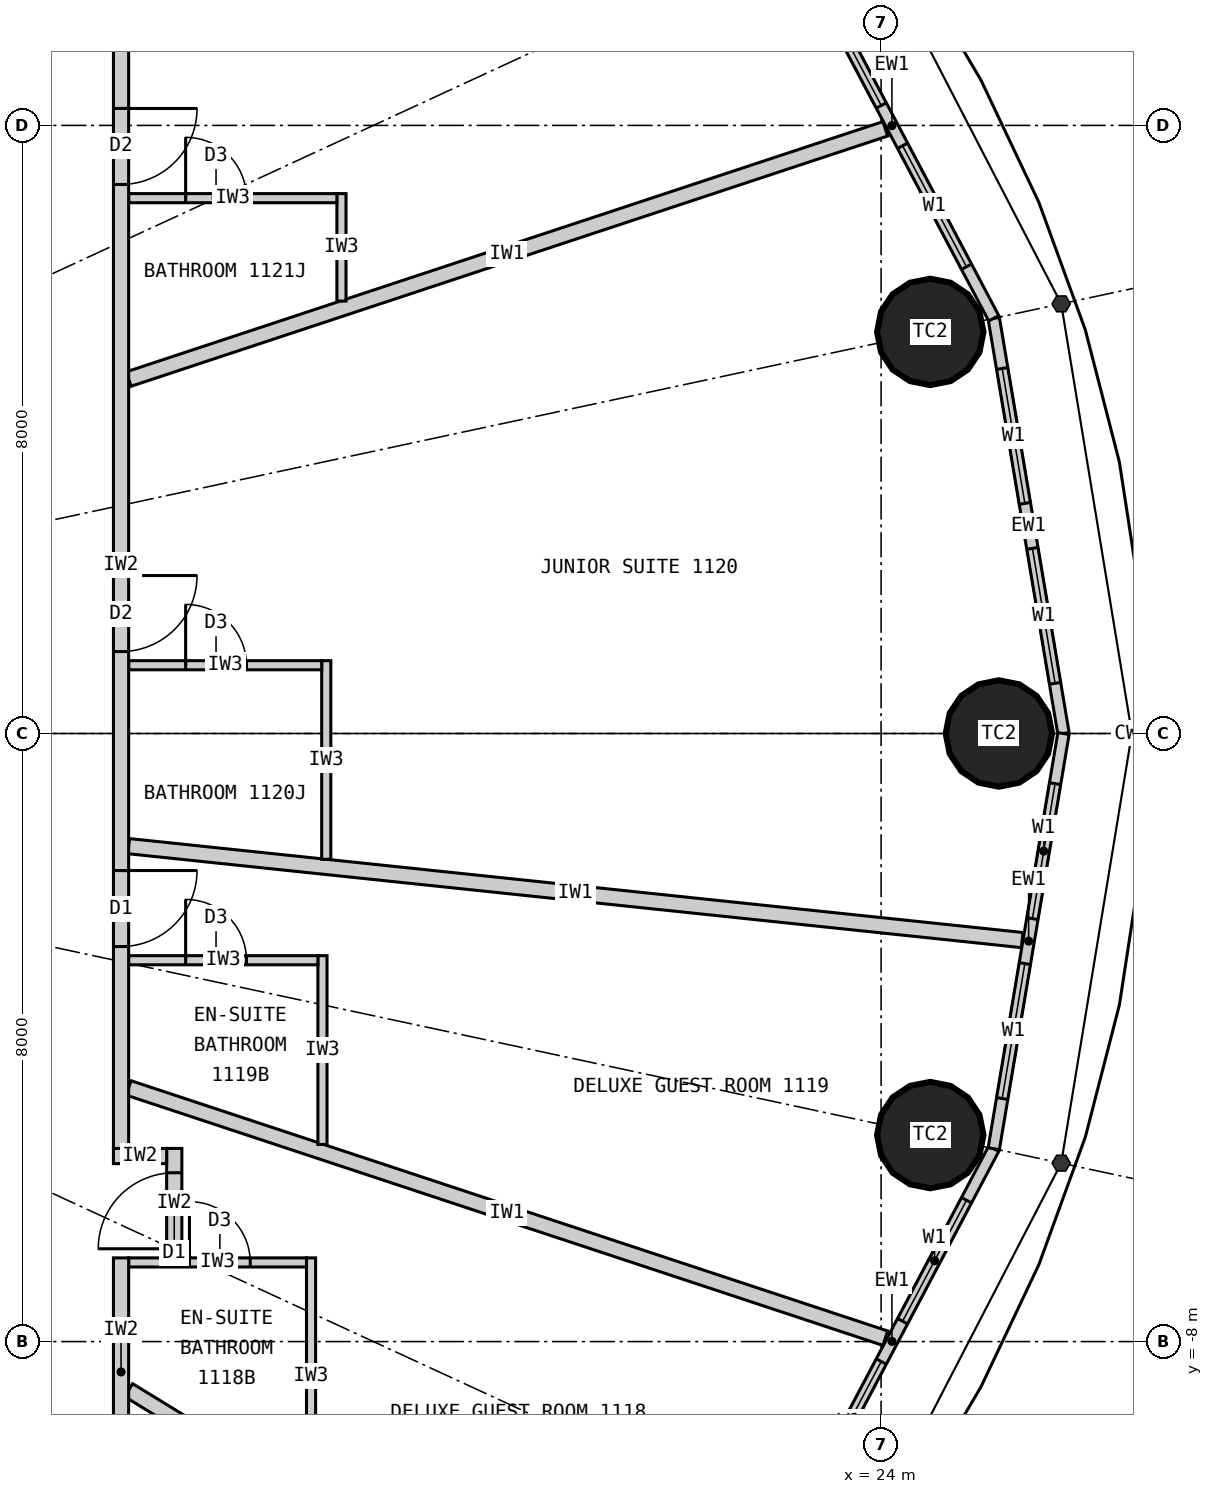
"""IFC4 building model, lengths in metres.
Left out: names, types, materials, properties, quantities, classifications, styles, units other than length and angle.
Written with IfcOpenShell. Run it as: python <this file> out.ifc"""

import sys

from ifc_helpers import new_model, si_unit, direction, frame, frame_2d, origin, origin_2d, place, context, subcontext, project, spatial, rectangle, circle, extrude, element, fill, save


model = new_model("IFC4")
c1 = context("Model", 3, precision=1e-05, world=origin(), true_north=direction((0.0, 1.0)))
c2 = subcontext(c1, "Body", "Model", "MODEL_VIEW")
j1 = project(units=[si_unit("LENGTHUNIT", "METRE"), si_unit("PLANEANGLEUNIT", "RADIAN")], contexts=[c1])
p1 = place(None, origin())
s1 = spatial("IfcSite", under=j1, at=p1, CompositionType="ELEMENT")
p2 = place(p1, origin())
s2 = spatial("IfcBuilding", under=s1, at=p2, CompositionType="ELEMENT")
p3 = place(p2, frame((0.0, 0.0, 50.7)))
s3 = spatial("IfcBuildingStorey", under=s2, at=p3, CompositionType="ELEMENT", Elevation=50.7)
for number, where, z_axis, x_axis in (
    (1, (25.55, 0.0, 0.0), (0.0, 0.0, 1.0), (1.0, 0.0, 0.0)),
    (2, (24.647, 5.283, 0.0), (0.0, 0.0, 1.0), (1.0, 0.0, 0.0)),
    (3, (24.647, -5.283, 0.0), (0.0, 0.0, 1.0), (1.0, 0.0, 0.0)),
):
    element("IfcColumn", number, at=place(p3, frame(where, z_axis=z_axis, x_axis=x_axis)), inside=s3, PredefinedType="COLUMN", context=c2, shape_type="SweptSolid", body=[
        extrude(circle(Radius=0.7, at=origin_2d()), origin(), (0.0, 0.0, 1.0), 3.3),
    ])
p4 = place(p3, frame((26.4, 0.0, 0.0), z_axis=(0.0, 0.0, 1.0), x_axis=(-0.165642551694, 0.986185857264, 0.0)))
e4 = element("IfcWall", 4, at=p4, inside=s3, PredefinedType="ELEMENTEDWALL", context=c2, shape_type="SweptSolid", body=[
    extrude(rectangle(XDim=5.539, YDim=0.15, at=frame_2d((2.77, 0.0))), origin(), (0.0, 0.0, 1.0), 3.12),
])
p5 = place(p4, frame((0.669, 0.0, 0.9)))
e5 = element("IfcOpeningElement", 5, at=p5, cuts=e4, PredefinedType="OPENING", context=c2, shape_type="SweptSolid", body=[
    extrude(rectangle(XDim=1.8, YDim=1.9, at=frame_2d((0.9, 0.95))), frame((0.0, 0.085, 0.0), z_axis=(0.0, -1.0, 0.0), x_axis=(1.0, 0.0, 0.0)), (0.0, 0.0, 1.0), 0.17),
])
p6 = place(p4, frame((3.07, 0.0, 0.9)))
e6 = element("IfcOpeningElement", 6, at=p6, cuts=e4, PredefinedType="OPENING", context=c2, shape_type="SweptSolid", body=[
    extrude(rectangle(XDim=1.8, YDim=1.9, at=frame_2d((0.9, 0.95))), frame((0.0, 0.085, 0.0), z_axis=(0.0, -1.0, 0.0), x_axis=(1.0, 0.0, 0.0)), (0.0, 0.0, 1.0), 0.17),
])
p7 = place(p3, frame((25.482, 5.462, 0.0), z_axis=(0.0, 0.0, 1.0), x_axis=(-0.467296867008, 0.884100468321, 0.0)))
e7 = element("IfcWall", 7, at=p7, inside=s3, PredefinedType="ELEMENTEDWALL", context=c2, shape_type="SweptSolid", body=[
    extrude(rectangle(XDim=5.734, YDim=0.15, at=frame_2d((2.867, 0.0))), origin(), (0.0, 0.0, 1.0), 3.12),
])
p8 = place(p7, frame((0.767, 0.0, 0.9)))
e8 = element("IfcOpeningElement", 8, at=p8, cuts=e7, PredefinedType="OPENING", context=c2, shape_type="SweptSolid", body=[
    extrude(rectangle(XDim=1.8, YDim=1.9, at=frame_2d((0.9, 0.95))), frame((0.0, 0.085, 0.0), z_axis=(0.0, -1.0, 0.0), x_axis=(1.0, 0.0, 0.0)), (0.0, 0.0, 1.0), 0.17),
])
p9 = place(p7, frame((3.167, 0.0, 0.9)))
e9 = element("IfcOpeningElement", 9, at=p9, cuts=e7, PredefinedType="OPENING", context=c2, shape_type="SweptSolid", body=[
    extrude(rectangle(XDim=1.8, YDim=1.9, at=frame_2d((0.9, 0.95))), frame((0.0, 0.085, 0.0), z_axis=(0.0, -1.0, 0.0), x_axis=(1.0, 0.0, 0.0)), (0.0, 0.0, 1.0), 0.17),
])
p10 = place(p3, frame((22.803, -10.532, 0.0), z_axis=(0.0, 0.0, 1.0), x_axis=(0.467296867008, 0.884100468321, 0.0)))
e10 = element("IfcWall", 10, at=p10, inside=s3, PredefinedType="ELEMENTEDWALL", context=c2, shape_type="SweptSolid", body=[
    extrude(rectangle(XDim=5.734, YDim=0.15, at=frame_2d((2.867, 0.0))), origin(), (0.0, 0.0, 1.0), 3.12),
])
p11 = place(p10, frame((0.767, 0.0, 0.9)))
e11 = element("IfcOpeningElement", 11, at=p11, cuts=e10, PredefinedType="OPENING", context=c2, shape_type="SweptSolid", body=[
    extrude(rectangle(XDim=1.8, YDim=1.9, at=frame_2d((0.9, 0.95))), frame((0.0, 0.085, 0.0), z_axis=(0.0, -1.0, 0.0), x_axis=(1.0, 0.0, 0.0)), (0.0, 0.0, 1.0), 0.17),
])
p12 = place(p10, frame((3.167, 0.0, 0.9)))
e12 = element("IfcOpeningElement", 12, at=p12, cuts=e10, PredefinedType="OPENING", context=c2, shape_type="SweptSolid", body=[
    extrude(rectangle(XDim=1.8, YDim=1.9, at=frame_2d((0.9, 0.95))), frame((0.0, 0.085, 0.0), z_axis=(0.0, -1.0, 0.0), x_axis=(1.0, 0.0, 0.0)), (0.0, 0.0, 1.0), 0.17),
])
p13 = place(p3, frame((25.482, -5.462, 0.0), z_axis=(0.0, 0.0, 1.0), x_axis=(0.165642551694, 0.986185857264, 0.0)))
e13 = element("IfcWall", 13, at=p13, inside=s3, PredefinedType="ELEMENTEDWALL", context=c2, shape_type="SweptSolid", body=[
    extrude(rectangle(XDim=5.539, YDim=0.15, at=frame_2d((2.77, 0.0))), origin(), (0.0, 0.0, 1.0), 3.12),
])
p14 = place(p13, frame((0.669, 0.0, 0.9)))
e14 = element("IfcOpeningElement", 14, at=p14, cuts=e13, PredefinedType="OPENING", context=c2, shape_type="SweptSolid", body=[
    extrude(rectangle(XDim=1.8, YDim=1.9, at=frame_2d((0.9, 0.95))), frame((0.0, 0.085, 0.0), z_axis=(0.0, -1.0, 0.0), x_axis=(1.0, 0.0, 0.0)), (0.0, 0.0, 1.0), 0.17),
])
p15 = place(p13, frame((3.07, 0.0, 0.9)))
e15 = element("IfcOpeningElement", 15, at=p15, cuts=e13, PredefinedType="OPENING", context=c2, shape_type="SweptSolid", body=[
    extrude(rectangle(XDim=1.8, YDim=1.9, at=frame_2d((0.9, 0.95))), frame((0.0, 0.085, 0.0), z_axis=(0.0, -1.0, 0.0), x_axis=(1.0, 0.0, 0.0)), (0.0, 0.0, 1.0), 0.17),
])
p16 = place(p3, frame((14.1, 4.663, 0.0), z_axis=(0.0, 0.0, 1.0), x_axis=(0.949432655039, 0.31397075269, 0.0)))
e16 = element("IfcWall", 16, at=p16, inside=s3, PredefinedType="PARTITIONING", context=c2, shape_type="SweptSolid", body=[
    extrude(rectangle(XDim=10.486, YDim=0.2, at=frame_2d((5.243, 0.0))), origin(), (0.0, 0.0, 1.0), 3.12),
])
p17 = place(p3, frame((14.1, -8.639, 0.0), z_axis=(0.0, 0.0, 1.0), x_axis=(0.852672493023, -0.522445805459, 0.0)))
e17 = element("IfcWall", 17, at=p17, inside=s3, PredefinedType="PARTITIONING", context=c2, shape_type="SweptSolid", body=[
    extrude(rectangle(XDim=7.633, YDim=0.2, at=frame_2d((3.817, 0.0))), origin(), (0.0, 0.0, 1.0), 3.12),
])
p18 = place(p3, frame((14.1, -4.663, 0.0), z_axis=(0.0, 0.0, 1.0), x_axis=(0.949432655039, -0.31397075269, 0.0)))
e18 = element("IfcWall", 18, at=p18, inside=s3, PredefinedType="PARTITIONING", context=c2, shape_type="SweptSolid", body=[
    extrude(rectangle(XDim=10.486, YDim=0.2, at=frame_2d((5.243, 0.0))), origin(), (0.0, 0.0, 1.0), 3.12),
])
p19 = place(p3, frame((14.1, -1.482, 0.0), z_axis=(0.0, 0.0, 1.0), x_axis=(0.994522076235, -0.104526742422, 0.0)))
e19 = element("IfcWall", 19, at=p19, inside=s3, PredefinedType="PARTITIONING", context=c2, shape_type="SweptSolid", body=[
    extrude(rectangle(XDim=11.821, YDim=0.2, at=frame_2d((5.91, 0.0))), origin(), (0.0, 0.0, 1.0), 2.32),
])
p20 = place(p3, frame((16.5, -10.01, 0.0), z_axis=(0.0, 0.0, 1.0), x_axis=(0.0, 1.0, 0.0)))
e20 = element("IfcWall", 20, at=p20, inside=s3, PredefinedType="PARTITIONING", context=c2, shape_type="SweptSolid", body=[
    extrude(rectangle(XDim=3.111, YDim=0.12, at=frame_2d((1.555, 0.0))), origin(), (0.0, 0.0, 1.0), 3.12),
])
p21 = place(p3, frame((14.1, -6.959, 0.0), z_axis=(0.0, 0.0, 1.0), x_axis=(1.0, 0.0, 0.0)))
e21 = element("IfcWall", 21, at=p21, inside=s3, PredefinedType="PARTITIONING", context=c2, shape_type="SweptSolid", body=[
    extrude(rectangle(XDim=2.34, YDim=0.12, at=frame_2d((1.17, 0.0))), origin(), (0.0, 0.0, 1.0), 3.12),
])
p22 = place(p21, frame((0.8, 0.0, 0.0)))
e22 = element("IfcOpeningElement", 22, at=p22, cuts=e21, PredefinedType="OPENING", context=c2, shape_type="SweptSolid", body=[
    extrude(rectangle(XDim=0.8, YDim=2.1, at=frame_2d((0.4, 1.05))), frame((0.0, 0.07, 0.0), z_axis=(0.0, -1.0, 0.0), x_axis=(1.0, 0.0, 0.0)), (0.0, 0.0, 1.0), 0.14),
])
p23 = place(p3, frame((16.65, -5.406, 0.0), z_axis=(0.0, 0.0, 1.0), x_axis=(0.0, 1.0, 0.0)))
e23 = element("IfcWall", 23, at=p23, inside=s3, PredefinedType="PARTITIONING", context=c2, shape_type="SweptSolid", body=[
    extrude(rectangle(XDim=2.483, YDim=0.12, at=frame_2d((1.242, 0.0))), origin(), (0.0, 0.0, 1.0), 3.12),
])
p24 = place(p3, frame((14.1, -2.983, 0.0), z_axis=(0.0, 0.0, 1.0), x_axis=(1.0, 0.0, 0.0)))
e24 = element("IfcWall", 24, at=p24, inside=s3, PredefinedType="PARTITIONING", context=c2, shape_type="SweptSolid", body=[
    extrude(rectangle(XDim=2.49, YDim=0.12, at=frame_2d((1.245, 0.0))), origin(), (0.0, 0.0, 1.0), 3.12),
])
p25 = place(p24, frame((0.75, 0.0, 0.0)))
e25 = element("IfcOpeningElement", 25, at=p25, cuts=e24, PredefinedType="OPENING", context=c2, shape_type="SweptSolid", body=[
    extrude(rectangle(XDim=0.8, YDim=2.1, at=frame_2d((0.4, 1.05))), frame((0.0, 0.07, 0.0), z_axis=(0.0, -1.0, 0.0), x_axis=(1.0, 0.0, 0.0)), (0.0, 0.0, 1.0), 0.14),
])
p26 = place(p3, frame((16.7, -1.655, 0.0), z_axis=(0.0, 0.0, 1.0), x_axis=(0.0, 1.0, 0.0)))
e26 = element("IfcWall", 26, at=p26, inside=s3, PredefinedType="PARTITIONING", context=c2, shape_type="SweptSolid", body=[
    extrude(rectangle(XDim=2.613, YDim=0.12, at=frame_2d((1.307, 0.0))), origin(), (0.0, 0.0, 1.0), 3.12),
])
p27 = place(p3, frame((14.1, 0.898, 0.0), z_axis=(0.0, 0.0, 1.0), x_axis=(1.0, 0.0, 0.0)))
e27 = element("IfcWall", 27, at=p27, inside=s3, PredefinedType="PARTITIONING", context=c2, shape_type="SweptSolid", body=[
    extrude(rectangle(XDim=2.54, YDim=0.12, at=frame_2d((1.27, 0.0))), origin(), (0.0, 0.0, 1.0), 3.12),
])
p28 = place(p27, frame((0.75, 0.0, 0.0)))
e28 = element("IfcOpeningElement", 28, at=p28, cuts=e27, PredefinedType="OPENING", context=c2, shape_type="SweptSolid", body=[
    extrude(rectangle(XDim=0.8, YDim=2.1, at=frame_2d((0.4, 1.05))), frame((0.0, 0.07, 0.0), z_axis=(0.0, -1.0, 0.0), x_axis=(1.0, 0.0, 0.0)), (0.0, 0.0, 1.0), 0.14),
])
p29 = place(p3, frame((16.9, 5.689, 0.0), z_axis=(0.0, 0.0, 1.0), x_axis=(0.0, 1.0, 0.0)))
e29 = element("IfcWall", 29, at=p29, inside=s3, PredefinedType="PARTITIONING", context=c2, shape_type="SweptSolid", body=[
    extrude(rectangle(XDim=1.414, YDim=0.12, at=frame_2d((0.707, 0.0))), origin(), (0.0, 0.0, 1.0), 3.12),
])
p30 = place(p3, frame((14.1, 7.043, 0.0), z_axis=(0.0, 0.0, 1.0), x_axis=(1.0, 0.0, 0.0)))
e30 = element("IfcWall", 30, at=p30, inside=s3, PredefinedType="PARTITIONING", context=c2, shape_type="SweptSolid", body=[
    extrude(rectangle(XDim=2.74, YDim=0.12, at=frame_2d((1.37, 0.0))), origin(), (0.0, 0.0, 1.0), 3.12),
])
p31 = place(p30, frame((0.75, 0.0, 0.0)))
e31 = element("IfcOpeningElement", 31, at=p31, cuts=e30, PredefinedType="OPENING", context=c2, shape_type="SweptSolid", body=[
    extrude(rectangle(XDim=0.8, YDim=2.1, at=frame_2d((0.4, 1.05))), frame((0.0, 0.07, 0.0), z_axis=(0.0, -1.0, 0.0), x_axis=(1.0, 0.0, 0.0)), (0.0, 0.0, 1.0), 0.14),
])
p32 = place(p3, frame((14.7, -6.899, 0.0), z_axis=(0.0, 0.0, 1.0), x_axis=(0.0, 1.0, 0.0)))
e32 = element("IfcWall", 32, at=p32, inside=s3, PredefinedType="PARTITIONING", context=c2, shape_type="SweptSolid", body=[
    extrude(rectangle(XDim=1.44, YDim=0.2, at=frame_2d((0.72, 0.0))), origin(), (0.0, 0.0, 1.0), 3.12),
])
p33 = place(p32, frame((0.12, 0.0, 0.0)))
e33 = element("IfcOpeningElement", 33, at=p33, cuts=e32, PredefinedType="OPENING", context=c2, shape_type="SweptSolid", body=[
    extrude(rectangle(XDim=1.0, YDim=2.2, at=frame_2d((0.5, 1.1))), frame((0.0, 0.11, 0.0), z_axis=(0.0, -1.0, 0.0), x_axis=(1.0, 0.0, 0.0)), (0.0, 0.0, 1.0), 0.22),
])
p34 = place(p3, frame((13.9, -5.559, 0.0), z_axis=(0.0, 0.0, 1.0), x_axis=(1.0, 0.0, 0.0)))
e34 = element("IfcWall", 34, at=p34, inside=s3, PredefinedType="PARTITIONING", context=c2, shape_type="SweptSolid", body=[
    extrude(rectangle(XDim=0.7, YDim=0.2, at=frame_2d((0.35, 0.0))), origin(), (0.0, 0.0, 1.0), 3.12),
])
p35 = place(p3, frame((14.0, -9.9, 0.0), z_axis=(0.0, 0.0, 1.0), x_axis=(0.0, 1.0, 0.0)))
e35 = element("IfcWall", 35, at=p35, inside=s3, PredefinedType="PARTITIONING", context=c2, shape_type="SweptSolid", body=[
    extrude(rectangle(XDim=3.001, YDim=0.2, at=frame_2d((1.5, 0.0))), origin(), (0.0, 0.0, 1.0), 3.12),
])
p36 = place(p3, frame((14.0, -5.459, 0.0), z_axis=(0.0, 0.0, 1.0), x_axis=(0.0, 1.0, 0.0)))
e36 = element("IfcWall", 36, at=p36, inside=s3, PredefinedType="PARTITIONING", context=c2, shape_type="SweptSolid", body=[
    extrude(rectangle(XDim=15.359, YDim=0.2, at=frame_2d((7.679, 0.0))), origin(), (0.0, 0.0, 1.0), 3.12),
])
p37 = place(p36, frame((2.656, 0.0, 0.0)))
e37 = element("IfcOpeningElement", 37, at=p37, cuts=e36, PredefinedType="OPENING", context=c2, shape_type="SweptSolid", body=[
    extrude(rectangle(XDim=1.0, YDim=2.2, at=frame_2d((0.5, 1.1))), frame((0.0, 0.11, 0.0), z_axis=(0.0, -1.0, 0.0), x_axis=(1.0, 0.0, 0.0)), (0.0, 0.0, 1.0), 0.22),
])
p38 = place(p36, frame((6.537, 0.0, 0.0)))
e38 = element("IfcOpeningElement", 38, at=p38, cuts=e36, PredefinedType="OPENING", context=c2, shape_type="SweptSolid", body=[
    extrude(rectangle(XDim=1.0, YDim=2.2, at=frame_2d((0.5, 1.1))), frame((0.0, 0.11, 0.0), z_axis=(0.0, -1.0, 0.0), x_axis=(1.0, 0.0, 0.0)), (0.0, 0.0, 1.0), 0.22),
])
p39 = place(p36, frame((12.682, 0.0, 0.0)))
e39 = element("IfcOpeningElement", 39, at=p39, cuts=e36, PredefinedType="OPENING", context=c2, shape_type="SweptSolid", body=[
    extrude(rectangle(XDim=1.0, YDim=2.2, at=frame_2d((0.5, 1.1))), frame((0.0, 0.11, 0.0), z_axis=(0.0, -1.0, 0.0), x_axis=(1.0, 0.0, 0.0)), (0.0, 0.0, 1.0), 0.22),
])
p40 = place(p5, origin())
e40 = element("IfcWindow", 40, at=p40, inside=s3, PartitioningType="SINGLE_PANEL", PredefinedType="WINDOW", context=c2, shape_type="SweptSolid", body=[
    extrude(rectangle(XDim=1.8, YDim=1.9, at=frame_2d((0.9, 0.95))), frame((0.0, 0.03, 0.0), z_axis=(0.0, -1.0, 0.0), x_axis=(1.0, 0.0, 0.0)), (0.0, 0.0, 1.0), 0.06),
])
fill(e5, e40)
p41 = place(p6, origin())
e41 = element("IfcWindow", 41, at=p41, inside=s3, PartitioningType="SINGLE_PANEL", PredefinedType="WINDOW", context=c2, shape_type="SweptSolid", body=[
    extrude(rectangle(XDim=1.8, YDim=1.9, at=frame_2d((0.9, 0.95))), frame((0.0, 0.03, 0.0), z_axis=(0.0, -1.0, 0.0), x_axis=(1.0, 0.0, 0.0)), (0.0, 0.0, 1.0), 0.06),
])
fill(e6, e41)
p42 = place(p8, origin())
e42 = element("IfcWindow", 42, at=p42, inside=s3, PartitioningType="SINGLE_PANEL", PredefinedType="WINDOW", context=c2, shape_type="SweptSolid", body=[
    extrude(rectangle(XDim=1.8, YDim=1.9, at=frame_2d((0.9, 0.95))), frame((0.0, 0.03, 0.0), z_axis=(0.0, -1.0, 0.0), x_axis=(1.0, 0.0, 0.0)), (0.0, 0.0, 1.0), 0.06),
])
fill(e8, e42)
p43 = place(p9, origin())
e43 = element("IfcWindow", 43, at=p43, inside=s3, PartitioningType="SINGLE_PANEL", PredefinedType="WINDOW", context=c2, shape_type="SweptSolid", body=[
    extrude(rectangle(XDim=1.8, YDim=1.9, at=frame_2d((0.9, 0.95))), frame((0.0, 0.03, 0.0), z_axis=(0.0, -1.0, 0.0), x_axis=(1.0, 0.0, 0.0)), (0.0, 0.0, 1.0), 0.06),
])
fill(e9, e43)
p44 = place(p11, origin())
e44 = element("IfcWindow", 44, at=p44, inside=s3, PartitioningType="SINGLE_PANEL", PredefinedType="WINDOW", context=c2, shape_type="SweptSolid", body=[
    extrude(rectangle(XDim=1.8, YDim=1.9, at=frame_2d((0.9, 0.95))), frame((0.0, 0.03, 0.0), z_axis=(0.0, -1.0, 0.0), x_axis=(1.0, 0.0, 0.0)), (0.0, 0.0, 1.0), 0.06),
])
fill(e11, e44)
p45 = place(p12, origin())
e45 = element("IfcWindow", 45, at=p45, inside=s3, PartitioningType="SINGLE_PANEL", PredefinedType="WINDOW", context=c2, shape_type="SweptSolid", body=[
    extrude(rectangle(XDim=1.8, YDim=1.9, at=frame_2d((0.9, 0.95))), frame((0.0, 0.03, 0.0), z_axis=(0.0, -1.0, 0.0), x_axis=(1.0, 0.0, 0.0)), (0.0, 0.0, 1.0), 0.06),
])
fill(e12, e45)
p46 = place(p14, origin())
e46 = element("IfcWindow", 46, at=p46, inside=s3, PartitioningType="SINGLE_PANEL", PredefinedType="WINDOW", context=c2, shape_type="SweptSolid", body=[
    extrude(rectangle(XDim=1.8, YDim=1.9, at=frame_2d((0.9, 0.95))), frame((0.0, 0.03, 0.0), z_axis=(0.0, -1.0, 0.0), x_axis=(1.0, 0.0, 0.0)), (0.0, 0.0, 1.0), 0.06),
])
fill(e14, e46)
p47 = place(p15, origin())
e47 = element("IfcWindow", 47, at=p47, inside=s3, PartitioningType="SINGLE_PANEL", PredefinedType="WINDOW", context=c2, shape_type="SweptSolid", body=[
    extrude(rectangle(XDim=1.8, YDim=1.9, at=frame_2d((0.9, 0.95))), frame((0.0, 0.03, 0.0), z_axis=(0.0, -1.0, 0.0), x_axis=(1.0, 0.0, 0.0)), (0.0, 0.0, 1.0), 0.06),
])
fill(e15, e47)
p48 = place(p22, origin())
e48 = element("IfcDoor", 48, at=p48, inside=s3, OperationType="SINGLE_SWING_LEFT", PredefinedType="DOOR", context=c2, shape_type="SweptSolid", body=[
    extrude(rectangle(XDim=0.8, YDim=2.1, at=frame_2d((0.4, 1.05))), frame((0.0, 0.025, 0.0), z_axis=(0.0, -1.0, 0.0), x_axis=(1.0, 0.0, 0.0)), (0.0, 0.0, 1.0), 0.05),
])
fill(e22, e48)
p49 = place(p33, origin())
e49 = element("IfcDoor", 49, at=p49, inside=s3, OperationType="SINGLE_SWING_LEFT", PredefinedType="DOOR", context=c2, shape_type="SweptSolid", body=[
    extrude(rectangle(XDim=1.0, YDim=2.2, at=frame_2d((0.5, 1.1))), frame((0.0, 0.025, 0.0), z_axis=(0.0, -1.0, 0.0), x_axis=(1.0, 0.0, 0.0)), (0.0, 0.0, 1.0), 0.05),
])
fill(e33, e49)
p50 = place(p25, origin())
e50 = element("IfcDoor", 50, at=p50, inside=s3, OperationType="SINGLE_SWING_LEFT", PredefinedType="DOOR", context=c2, shape_type="SweptSolid", body=[
    extrude(rectangle(XDim=0.8, YDim=2.1, at=frame_2d((0.4, 1.05))), frame((0.0, 0.025, 0.0), z_axis=(0.0, -1.0, 0.0), x_axis=(1.0, 0.0, 0.0)), (0.0, 0.0, 1.0), 0.05),
])
fill(e25, e50)
p51 = place(p37, origin())
e51 = element("IfcDoor", 51, at=p51, inside=s3, OperationType="SINGLE_SWING_RIGHT", PredefinedType="DOOR", context=c2, shape_type="SweptSolid", body=[
    extrude(rectangle(XDim=1.0, YDim=2.2, at=frame_2d((0.5, 1.1))), frame((0.0, 0.025, 0.0), z_axis=(0.0, -1.0, 0.0), x_axis=(1.0, 0.0, 0.0)), (0.0, 0.0, 1.0), 0.05),
])
fill(e37, e51)
p52 = place(p28, origin())
e52 = element("IfcDoor", 52, at=p52, inside=s3, OperationType="SINGLE_SWING_LEFT", PredefinedType="DOOR", context=c2, shape_type="SweptSolid", body=[
    extrude(rectangle(XDim=0.8, YDim=2.1, at=frame_2d((0.4, 1.05))), frame((0.0, 0.025, 0.0), z_axis=(0.0, -1.0, 0.0), x_axis=(1.0, 0.0, 0.0)), (0.0, 0.0, 1.0), 0.05),
])
fill(e28, e52)
p53 = place(p38, origin())
e53 = element("IfcDoor", 53, at=p53, inside=s3, OperationType="SINGLE_SWING_RIGHT", PredefinedType="DOOR", context=c2, shape_type="SweptSolid", body=[
    extrude(rectangle(XDim=1.0, YDim=2.2, at=frame_2d((0.5, 1.1))), frame((0.0, 0.025, 0.0), z_axis=(0.0, -1.0, 0.0), x_axis=(1.0, 0.0, 0.0)), (0.0, 0.0, 1.0), 0.05),
])
fill(e38, e53)
p54 = place(p31, origin())
e54 = element("IfcDoor", 54, at=p54, inside=s3, OperationType="SINGLE_SWING_LEFT", PredefinedType="DOOR", context=c2, shape_type="SweptSolid", body=[
    extrude(rectangle(XDim=0.8, YDim=2.1, at=frame_2d((0.4, 1.05))), frame((0.0, 0.025, 0.0), z_axis=(0.0, -1.0, 0.0), x_axis=(1.0, 0.0, 0.0)), (0.0, 0.0, 1.0), 0.05),
])
fill(e31, e54)
p55 = place(p39, origin())
e55 = element("IfcDoor", 55, at=p55, inside=s3, OperationType="SINGLE_SWING_RIGHT", PredefinedType="DOOR", context=c2, shape_type="SweptSolid", body=[
    extrude(rectangle(XDim=1.0, YDim=2.2, at=frame_2d((0.5, 1.1))), frame((0.0, 0.025, 0.0), z_axis=(0.0, -1.0, 0.0), x_axis=(1.0, 0.0, 0.0)), (0.0, 0.0, 1.0), 0.05),
])
fill(e39, e55)
save(model, sys.argv[1])
